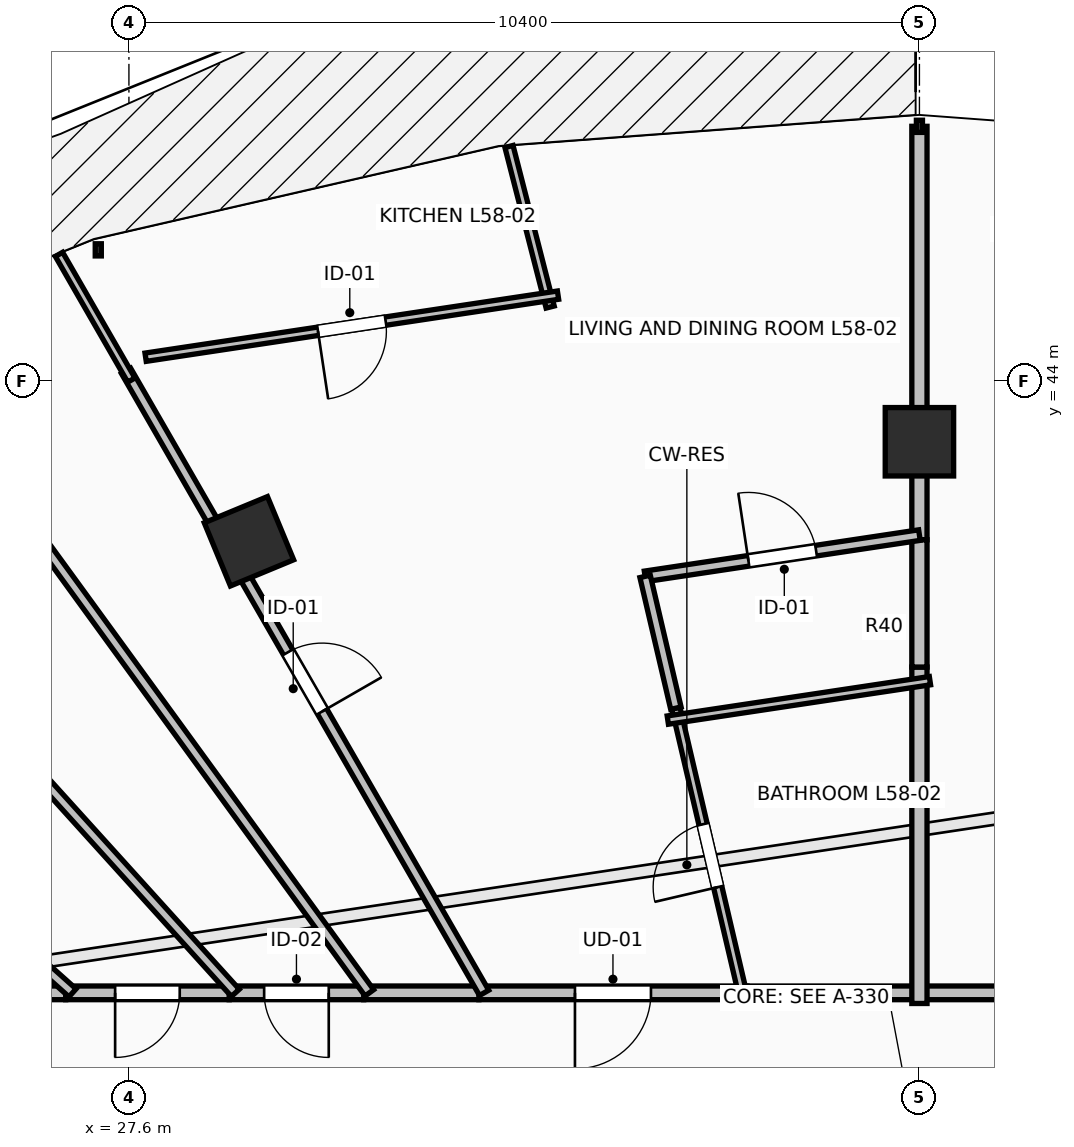
"""IFC4 building model, lengths in metres.
Left out: names, types, materials, properties, quantities, classifications, styles, units other than length and angle.
Written with IfcOpenShell. Run it as: python <this file> out.ifc"""

import sys

from ifc_helpers import new_model, si_unit, direction, frame, frame_2d, origin, origin_2d, place, context, subcontext, project, spatial, rectangle, extrude, element, fill, save


model = new_model("IFC4")
c1 = context("Model", 3, precision=1e-05, world=origin(), true_north=direction((0.0, 1.0)))
c2 = subcontext(c1, "Body", "Model", "MODEL_VIEW")
j1 = project(units=[si_unit("LENGTHUNIT", "METRE"), si_unit("PLANEANGLEUNIT", "RADIAN")], contexts=[c1])
p1 = place(None, origin())
s1 = spatial("IfcSite", under=j1, at=p1, CompositionType="ELEMENT")
p2 = place(p1, origin())
s2 = spatial("IfcBuilding", under=s1, at=p2, CompositionType="ELEMENT")
p3 = place(p2, frame((0.0, 0.0, 214.3)))
s3 = spatial("IfcBuildingStorey", under=s2, at=p3, CompositionType="ELEMENT", Elevation=214.3)
for number, where, z_axis, x_axis in (
    (1, (38.0, 43.2, 0.0), (0.0, 0.0, 1.0), (0.0, 1.0, 0.0)),
    (2, (29.179, 41.891, 0.0), (0.0, 0.0, 1.0), (-0.383, 0.924, 0.0)),
):
    element("IfcColumn", number, at=place(p3, frame(where, z_axis=z_axis, x_axis=x_axis)), inside=s3, PredefinedType="COLUMN", context=c2, shape_type="SweptSolid", body=[
        extrude(rectangle(XDim=0.9, YDim=0.9, at=origin_2d()), origin(), (0.0, 0.0, 1.0), 3.55),
    ])
p4 = place(p3, frame((39.157, 35.95, 0.0), z_axis=(0.0, 0.0, 1.0), x_axis=(-1.0, 0.0, 0.0)))
e3 = element("IfcWall", 3, at=p4, inside=s3, PredefinedType="PARTITIONING", context=c2, shape_type="SweptSolid", body=[
    extrude(rectangle(XDim=1.217, YDim=0.18, at=frame_2d((0.608, 0.0))), origin(), (0.0, 0.0, 1.0), 2.979),
])
p5 = place(p3, frame((35.732, 35.95, 0.0), z_axis=(0.0, 0.0, 1.0), x_axis=(-1.0, 0.0, 0.0)))
e4 = element("IfcWall", 4, at=p5, inside=s3, PredefinedType="PARTITIONING", context=c2, shape_type="SweptSolid", body=[
    extrude(rectangle(XDim=3.528, YDim=0.18, at=frame_2d((1.764, 0.0))), origin(), (0.0, 0.0, 1.0), 2.979),
])
p6 = place(p5, frame((1.264, 0.0, 0.0)))
e5 = element("IfcOpeningElement", 5, at=p6, cuts=e4, PredefinedType="OPENING", context=c2, shape_type="SweptSolid", body=[
    extrude(rectangle(XDim=1.0, YDim=2.15, at=frame_2d((0.5, 1.075))), frame((0.0, 0.105, 0.0), z_axis=(0.0, -1.0, 0.0), x_axis=(1.0, 0.0, 0.0)), (0.0, 0.0, 1.0), 0.21),
])
p7 = place(p3, frame((38.08, 35.95, 0.0), z_axis=(0.0, 0.0, 1.0), x_axis=(-1.0, 0.0, 0.0)))
e6 = element("IfcWall", 6, at=p7, inside=s3, PredefinedType="PARTITIONING", context=c2, shape_type="SweptSolid", body=[
    extrude(rectangle(XDim=2.488, YDim=0.18, at=frame_2d((1.244, 0.0))), origin(), (0.0, 0.0, 1.0), 2.979),
])
p8 = place(p3, frame((32.204, 35.95, 0.0), z_axis=(0.0, 0.0, 1.0), x_axis=(-1.0, 0.0, 0.0)))
e7 = element("IfcWall", 7, at=p8, inside=s3, PredefinedType="PARTITIONING", context=c2, shape_type="SweptSolid", body=[
    extrude(rectangle(XDim=1.515, YDim=0.18, at=frame_2d((0.758, 0.0))), origin(), (0.0, 0.0, 1.0), 3.29),
])
p9 = place(p3, frame((30.689, 35.95, 0.0), z_axis=(0.0, 0.0, 1.0), x_axis=(-1.0, 0.0, 0.0)))
e8 = element("IfcWall", 8, at=p9, inside=s3, PredefinedType="PARTITIONING", context=c2, shape_type="SweptSolid", body=[
    extrude(rectangle(XDim=1.77, YDim=0.18, at=frame_2d((0.885, 0.0))), origin(), (0.0, 0.0, 1.0), 2.482),
])
p10 = place(p9, frame((0.46, 0.0, 0.0)))
e9 = element("IfcOpeningElement", 9, at=p10, cuts=e8, PredefinedType="OPENING", context=c2, shape_type="SweptSolid", body=[
    extrude(rectangle(XDim=0.85, YDim=2.1, at=frame_2d((0.425, 1.05))), frame((0.0, 0.105, 0.0), z_axis=(0.0, -1.0, 0.0), x_axis=(1.0, 0.0, 0.0)), (0.0, 0.0, 1.0), 0.21),
])
p11 = place(p3, frame((28.919, 35.95, 0.0), z_axis=(0.0, 0.0, 1.0), x_axis=(-1.0, 0.0, 0.0)))
e10 = element("IfcWall", 10, at=p11, inside=s3, PredefinedType="PARTITIONING", context=c2, shape_type="SweptSolid", body=[
    extrude(rectangle(XDim=2.151, YDim=0.18, at=frame_2d((1.075, 0.0))), origin(), (0.0, 0.0, 1.0), 2.482),
])
p12 = place(p11, frame((0.65, 0.0, 0.0)))
e11 = element("IfcOpeningElement", 11, at=p12, cuts=e10, PredefinedType="OPENING", context=c2, shape_type="SweptSolid", body=[
    extrude(rectangle(XDim=0.85, YDim=2.1, at=frame_2d((0.425, 1.05))), frame((0.0, 0.105, 0.0), z_axis=(0.0, -1.0, 0.0), x_axis=(1.0, 0.0, 0.0)), (0.0, 0.0, 1.0), 0.21),
])
p13 = place(p3, frame((26.768, 35.95, 0.0), z_axis=(0.0, 0.0, 1.0), x_axis=(-1.0, 0.0, 0.0)))
e12 = element("IfcWall", 12, at=p13, inside=s3, PredefinedType="PARTITIONING", context=c2, shape_type="SweptSolid", body=[
    extrude(rectangle(XDim=1.568, YDim=0.18, at=frame_2d((0.784, 0.0))), origin(), (0.0, 0.0, 1.0), 3.29),
])
p14 = place(p3, frame((38.0, 47.35, 0.0), z_axis=(0.0, 0.0, 1.0), x_axis=(0.0, -1.0, 0.0)))
e13 = element("IfcWall", 13, at=p14, inside=s3, PredefinedType="PARTITIONING", context=c2, shape_type="SweptSolid", body=[
    extrude(rectangle(XDim=5.439, YDim=0.2, at=frame_2d((2.72, 0.0))), origin(), (0.0, 0.0, 1.0), 3.29),
])
p15 = place(p3, frame((38.0, 40.236, 0.0), z_axis=(0.0, 0.0, 1.0), x_axis=(0.0, -1.0, 0.0)))
e14 = element("IfcWall", 14, at=p15, inside=s3, PredefinedType="PARTITIONING", context=c2, shape_type="SweptSolid", body=[
    extrude(rectangle(XDim=4.426, YDim=0.2, at=frame_2d((2.213, 0.0))), origin(), (0.0, 0.0, 1.0), 2.936),
])
p16 = place(p3, frame((38.0, 41.911, 0.0), z_axis=(0.0, 0.0, 1.0), x_axis=(0.0, -1.0, 0.0)))
e15 = element("IfcWall", 15, at=p16, inside=s3, PredefinedType="PARTITIONING", context=c2, shape_type="SweptSolid", body=[
    extrude(rectangle(XDim=1.675, YDim=0.2, at=frame_2d((0.837, 0.0))), origin(), (0.0, 0.0, 1.0), 3.29),
])
p17 = place(p3, frame((35.704, 35.814, 0.0), z_axis=(0.0, 0.0, 1.0), x_axis=(-0.227707800263, 0.973729509515, 0.0)))
e16 = element("IfcWall", 16, at=p17, inside=s3, PredefinedType="PARTITIONING", context=c2, shape_type="SweptSolid", body=[
    extrude(rectangle(XDim=3.986, YDim=0.11, at=frame_2d((1.993, 0.0))), origin(), (0.0, 0.0, 1.0), 2.936),
])
p18 = place(p17, frame((1.568, 0.0, 0.0)))
e17 = element("IfcOpeningElement", 17, at=p18, cuts=e16, PredefinedType="OPENING", context=c2, shape_type="SweptSolid", body=[
    extrude(rectangle(XDim=0.85, YDim=2.1, at=frame_2d((0.425, 1.05))), frame((0.0, 0.07, 0.0), z_axis=(0.0, -1.0, 0.0), x_axis=(1.0, 0.0, 0.0)), (0.0, 0.0, 1.0), 0.14),
])
p19 = place(p3, frame((32.6, 47.085, 0.0), z_axis=(0.0, 0.0, 1.0), x_axis=(0.248431915259, -0.96864936044, 0.0)))
e18 = element("IfcWall", 18, at=p19, inside=s3, PredefinedType="PARTITIONING", context=c2, shape_type="SweptSolid", body=[
    extrude(rectangle(XDim=2.181, YDim=0.11, at=frame_2d((1.09, 0.0))), origin(), (0.0, 0.0, 1.0), 3.29),
])
p20 = place(p3, frame((33.245, 45.129, 0.0), z_axis=(0.0, 0.0, 1.0), x_axis=(-0.988861815895, -0.148836517916, 0.0)))
e19 = element("IfcWall", 19, at=p20, inside=s3, PredefinedType="PARTITIONING", context=c2, shape_type="SweptSolid", body=[
    extrude(rectangle(XDim=5.487, YDim=0.11, at=frame_2d((2.743, 0.0))), origin(), (0.0, 0.0, 1.0), 3.29),
])
p21 = place(p20, frame((2.293, 0.0, 0.0)))
e20 = element("IfcOpeningElement", 20, at=p21, cuts=e19, PredefinedType="OPENING", context=c2, shape_type="SweptSolid", body=[
    extrude(rectangle(XDim=0.9, YDim=2.1, at=frame_2d((0.45, 1.05))), frame((0.0, 0.07, 0.0), z_axis=(0.0, -1.0, 0.0), x_axis=(1.0, 0.0, 0.0)), (0.0, 0.0, 1.0), 0.14),
])
p22 = place(p3, frame((34.391, 41.429, 0.0), z_axis=(0.0, 0.0, 1.0), x_axis=(0.988870503719, 0.148778785027, 0.0)))
e21 = element("IfcWall", 21, at=p22, inside=s3, PredefinedType="PARTITIONING", context=c2, shape_type="SweptSolid", body=[
    extrude(rectangle(XDim=3.649, YDim=0.14, at=frame_2d((1.825, 0.0))), origin(), (0.0, 0.0, 1.0), 2.482),
])
p23 = place(p22, frame((1.375, 0.0, 0.0)))
e22 = element("IfcOpeningElement", 22, at=p23, cuts=e21, PredefinedType="OPENING", context=c2, shape_type="SweptSolid", body=[
    extrude(rectangle(XDim=0.9, YDim=2.1, at=frame_2d((0.45, 1.05))), frame((0.0, 0.085, 0.0), z_axis=(0.0, -1.0, 0.0), x_axis=(1.0, 0.0, 0.0)), (0.0, 0.0, 1.0), 0.17),
])
p24 = place(p3, frame((34.796, 39.695, 0.0), z_axis=(0.0, 0.0, 1.0), x_axis=(-0.227502715531, 0.973777446045, 0.0)))
e23 = element("IfcWall", 23, at=p24, inside=s3, PredefinedType="PARTITIONING", context=c2, shape_type="SweptSolid", body=[
    extrude(rectangle(XDim=1.78, YDim=0.14, at=frame_2d((0.89, 0.0))), origin(), (0.0, 0.0, 1.0), 2.482),
])
p25 = place(p3, frame((27.562, 44.133, 0.0), z_axis=(0.0, 0.0, 1.0), x_axis=(0.498920898859, -0.866647527361, 0.0)))
e24 = element("IfcWall", 24, at=p25, inside=s3, PredefinedType="PARTITIONING", context=c2, shape_type="SweptSolid", body=[
    extrude(rectangle(XDim=9.442, YDim=0.14, at=frame_2d((4.721, 0.0))), origin(), (0.0, 0.0, 1.0), 2.482),
])
p26 = place(p25, frame((4.271, 0.0, 0.0)))
e25 = element("IfcOpeningElement", 25, at=p26, cuts=e24, PredefinedType="OPENING", context=c2, shape_type="SweptSolid", body=[
    extrude(rectangle(XDim=0.9, YDim=2.1, at=frame_2d((0.45, 1.05))), frame((0.0, 0.085, 0.0), z_axis=(0.0, -1.0, 0.0), x_axis=(1.0, 0.0, 0.0)), (0.0, 0.0, 1.0), 0.17),
])
p27 = place(p3, frame((38.138, 40.057, 0.0), z_axis=(0.0, 0.0, 1.0), x_axis=(-0.988873620703, -0.14875806626, 0.0)))
e26 = element("IfcWall", 26, at=p27, inside=s3, PredefinedType="PARTITIONING", context=c2, shape_type="SweptSolid", body=[
    extrude(rectangle(XDim=3.488, YDim=0.11, at=frame_2d((1.744, 0.0))), origin(), (0.0, 0.0, 1.0), 2.936),
])
p28 = place(p3, frame((26.68, 45.665, 0.0), z_axis=(0.0, 0.0, 1.0), x_axis=(0.498810083909, -0.866711313062, 0.0)))
e27 = element("IfcWall", 27, at=p28, inside=s3, PredefinedType="PARTITIONING", context=c2, shape_type="SweptSolid", body=[
    extrude(rectangle(XDim=1.908, YDim=0.11, at=frame_2d((0.954, 0.0))), origin(), (0.0, 0.0, 1.0), 3.29),
])
p29 = place(p3, frame((24.46, 44.617, 0.0), z_axis=(0.0, 0.0, 1.0), x_axis=(0.588154087929, -0.808748891098, 0.0)))
e28 = element("IfcWall", 28, at=p29, inside=s3, PredefinedType="PARTITIONING", context=c2, shape_type="SweptSolid", body=[
    extrude(rectangle(XDim=10.717, YDim=0.14, at=frame_2d((5.358, 0.0))), origin(), (0.0, 0.0, 1.0), 2.482),
])
p30 = place(p3, frame((22.077, 43.603, 0.0), z_axis=(0.0, 0.0, 1.0), x_axis=(0.670853853748, -0.741589581177, 0.0)))
e29 = element("IfcWall", 29, at=p30, inside=s3, PredefinedType="PARTITIONING", context=c2, shape_type="SweptSolid", body=[
    extrude(rectangle(XDim=10.32, YDim=0.14, at=frame_2d((5.16, 0.0))), origin(), (0.0, 0.0, 1.0), 2.482),
])
p31 = place(p3, frame((19.844, 42.214, 0.0), z_axis=(0.0, 0.0, 1.0), x_axis=(0.745845988041, -0.666118429502, 0.0)))
e30 = element("IfcWall", 30, at=p31, inside=s3, PredefinedType="PARTITIONING", context=c2, shape_type="SweptSolid", body=[
    extrude(rectangle(XDim=9.404, YDim=0.14, at=frame_2d((4.702, 0.0))), origin(), (0.0, 0.0, 1.0), 2.824),
])
p32 = place(p31, frame((4.277, 0.0, 0.0)))
e31 = element("IfcOpeningElement", 31, at=p32, cuts=e30, PredefinedType="OPENING", context=c2, shape_type="SweptSolid", body=[
    extrude(rectangle(XDim=0.85, YDim=2.1, at=frame_2d((0.425, 1.05))), frame((0.0, 0.085, 0.0), z_axis=(0.0, -1.0, 0.0), x_axis=(1.0, 0.0, 0.0)), (0.0, 0.0, 1.0), 0.17),
])
p33 = place(p6, origin())
e32 = element("IfcDoor", 32, at=p33, inside=s3, OperationType="SINGLE_SWING_RIGHT", PredefinedType="DOOR", context=c2, shape_type="SweptSolid", body=[
    extrude(rectangle(XDim=1.0, YDim=2.15, at=frame_2d((0.5, 1.075))), frame((0.0, 0.025, 0.0), z_axis=(0.0, -1.0, 0.0), x_axis=(1.0, 0.0, 0.0)), (0.0, 0.0, 1.0), 0.05),
])
fill(e5, e32)
p34 = place(p18, origin())
e33 = element("IfcDoor", 33, at=p34, inside=s3, OperationType="SINGLE_SWING_LEFT", PredefinedType="DOOR", context=c2, shape_type="SweptSolid", body=[
    extrude(rectangle(XDim=0.85, YDim=2.1, at=frame_2d((0.425, 1.05))), frame((0.0, 0.025, 0.0), z_axis=(0.0, -1.0, 0.0), x_axis=(1.0, 0.0, 0.0)), (0.0, 0.0, 1.0), 0.05),
])
fill(e17, e33)
p35 = place(p21, origin())
e34 = element("IfcDoor", 34, at=p35, inside=s3, OperationType="SINGLE_SWING_RIGHT", PredefinedType="DOOR", context=c2, shape_type="SweptSolid", body=[
    extrude(rectangle(XDim=0.9, YDim=2.1, at=frame_2d((0.45, 1.05))), frame((0.0, 0.025, 0.0), z_axis=(0.0, -1.0, 0.0), x_axis=(1.0, 0.0, 0.0)), (0.0, 0.0, 1.0), 0.05),
])
fill(e20, e34)
p36 = place(p23, origin())
e35 = element("IfcDoor", 35, at=p36, inside=s3, OperationType="SINGLE_SWING_LEFT", PredefinedType="DOOR", context=c2, shape_type="SweptSolid", body=[
    extrude(rectangle(XDim=0.9, YDim=2.1, at=frame_2d((0.45, 1.05))), frame((0.0, 0.025, 0.0), z_axis=(0.0, -1.0, 0.0), x_axis=(1.0, 0.0, 0.0)), (0.0, 0.0, 1.0), 0.05),
])
fill(e22, e35)
p37 = place(p26, origin())
e36 = element("IfcDoor", 36, at=p37, inside=s3, OperationType="SINGLE_SWING_RIGHT", PredefinedType="DOOR", context=c2, shape_type="SweptSolid", body=[
    extrude(rectangle(XDim=0.9, YDim=2.1, at=frame_2d((0.45, 1.05))), frame((0.0, 0.025, 0.0), z_axis=(0.0, -1.0, 0.0), x_axis=(1.0, 0.0, 0.0)), (0.0, 0.0, 1.0), 0.05),
])
fill(e25, e36)
p38 = place(p10, origin())
e37 = element("IfcDoor", 37, at=p38, inside=s3, OperationType="SINGLE_SWING_LEFT", PredefinedType="DOOR", context=c2, shape_type="SweptSolid", body=[
    extrude(rectangle(XDim=0.85, YDim=2.1, at=frame_2d((0.425, 1.05))), frame((0.0, 0.025, 0.0), z_axis=(0.0, -1.0, 0.0), x_axis=(1.0, 0.0, 0.0)), (0.0, 0.0, 1.0), 0.05),
])
fill(e9, e37)
p39 = place(p12, origin())
e38 = element("IfcDoor", 38, at=p39, inside=s3, OperationType="SINGLE_SWING_RIGHT", PredefinedType="DOOR", context=c2, shape_type="SweptSolid", body=[
    extrude(rectangle(XDim=0.85, YDim=2.1, at=frame_2d((0.425, 1.05))), frame((0.0, 0.025, 0.0), z_axis=(0.0, -1.0, 0.0), x_axis=(1.0, 0.0, 0.0)), (0.0, 0.0, 1.0), 0.05),
])
fill(e11, e38)
save(model, sys.argv[1])
